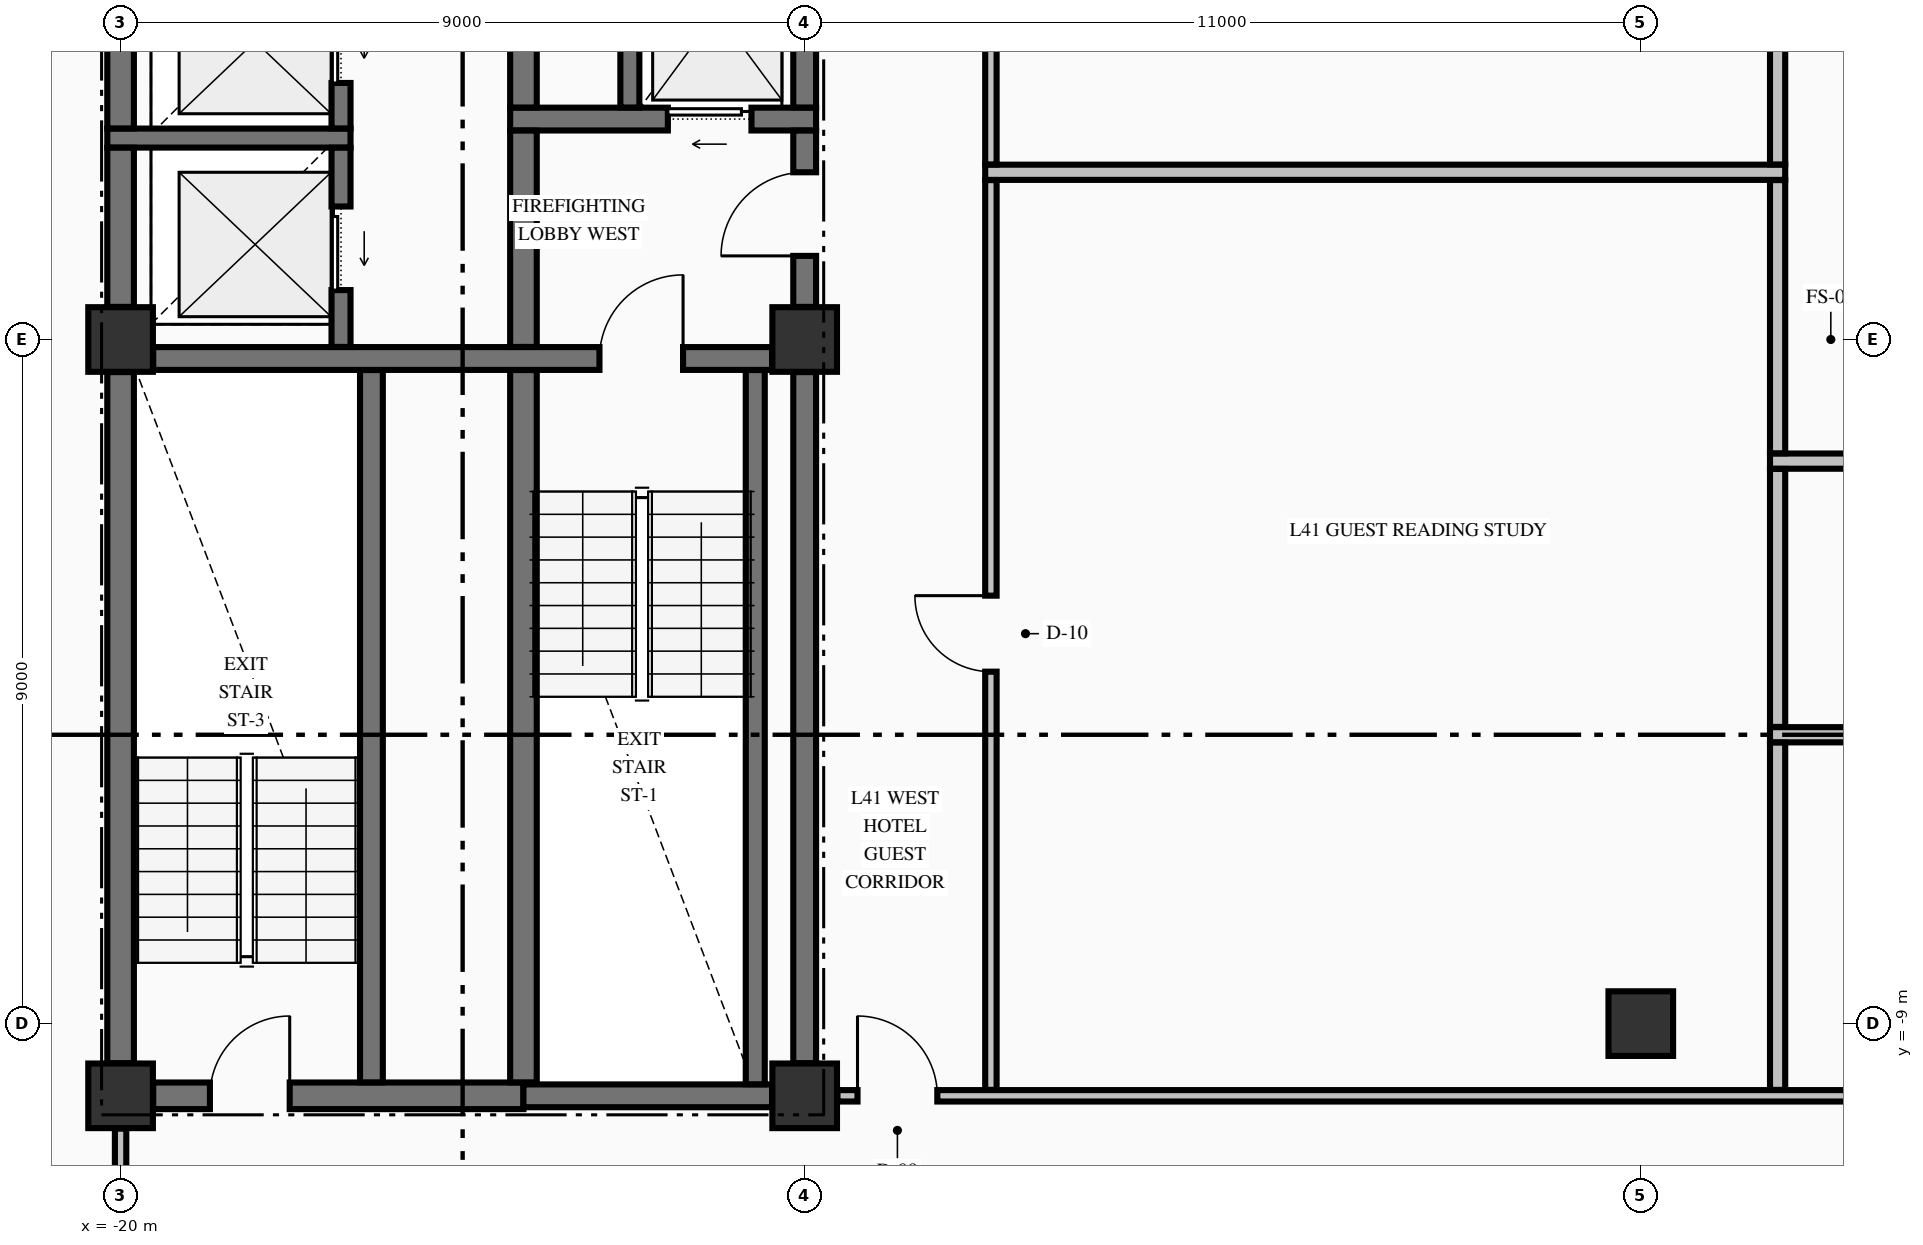
"""IFC4 building model, lengths in metres.
Left out: names, types, materials, properties, quantities, classifications, styles, units other than length and angle.
Written with IfcOpenShell. Run it as: python <this file> out.ifc"""

import sys

from ifc_helpers import new_model, si_unit, direction, frame, frame_2d, origin, origin_2d, place, context, subcontext, project, spatial, rectangle, extrude, element, fill, save


model = new_model("IFC4")
c1 = context("Model", 3, precision=1e-05, world=origin(), true_north=direction((0.0, 1.0)))
c2 = subcontext(c1, "Body", "Model", "MODEL_VIEW")
j1 = project(units=[si_unit("LENGTHUNIT", "METRE"), si_unit("PLANEANGLEUNIT", "RADIAN")], contexts=[c1])
p1 = place(None, origin())
s1 = spatial("IfcSite", under=j1, at=p1, CompositionType="ELEMENT")
p2 = place(p1, origin())
s2 = spatial("IfcBuilding", under=s1, at=p2, CompositionType="ELEMENT")
p3 = place(p2, frame((0.0, 0.0, 162.66)))
s3 = spatial("IfcBuildingStorey", under=s2, at=p3, CompositionType="ELEMENT", Elevation=162.66)
for number, where, z_axis, x_axis in (
    (1, (-20.0, -9.95, -0.25), (0.0, 0.0, 1.0), (1.0, 0.0, 0.0)),
    (2, (-11.0, -9.95, -0.25), (0.0, 0.0, 1.0), (1.0, 0.0, 0.0)),
    (3, (-11.0, 0.0, -0.25), (0.0, 0.0, 1.0), (1.0, 0.0, 0.0)),
    (4, (0.0, -9.0, -0.25), (0.0, 0.0, 1.0), (1.0, 0.0, 0.0)),
    (5, (-20.0, 0.0, -0.25), (0.0, 0.0, 1.0), (1.0, 0.0, 0.0)),
):
    element("IfcColumn", number, at=place(p3, frame(where, z_axis=z_axis, x_axis=x_axis)), inside=s3, PredefinedType="COLUMN", context=c2, shape_type="SweptSolid", body=[
        extrude(rectangle(XDim=0.85, YDim=0.85, at=origin_2d()), origin(), (0.0, 0.0, 1.0), 3.4),
    ])
p4 = place(p3, frame((-19.571, -9.95, 0.0), z_axis=(0.0, 0.0, 1.0), x_axis=(1.0, 0.0, 0.0)))
e6 = element("IfcWall", 6, at=p4, inside=s3, PredefinedType="SHEAR", context=c2, shape_type="SweptSolid", body=[
    extrude(rectangle(XDim=4.871, YDim=0.35, at=frame_2d((2.436, 0.0))), origin(), (0.0, 0.0, 1.0), 3.15),
])
p5 = place(p4, frame((0.746, 0.0, 0.0)))
e7 = element("IfcOpeningElement", 7, at=p5, cuts=e6, PredefinedType="OPENING", context=c2, shape_type="SweptSolid", body=[
    extrude(rectangle(XDim=1.05, YDim=2.15, at=frame_2d((0.525, 1.075))), frame((0.0, 0.185, 0.0), z_axis=(0.0, -1.0, 0.0), x_axis=(1.0, 0.0, 0.0)), (0.0, 0.0, 1.0), 0.37),
])
p6 = place(p3, frame((-14.7, -9.95, 0.0), z_axis=(0.0, 0.0, 1.0), x_axis=(1.0, 0.0, 0.0)))
e8 = element("IfcWall", 8, at=p6, inside=s3, PredefinedType="SHEAR", context=c2, shape_type="SweptSolid", body=[
    extrude(rectangle(XDim=3.271, YDim=0.3, at=frame_2d((1.635, 0.0))), origin(), (0.0, 0.0, 1.0), 3.15),
])
p7 = place(p3, frame((-19.571, -0.25, 0.0), z_axis=(0.0, 0.0, 1.0), x_axis=(1.0, 0.0, 0.0)))
e9 = element("IfcWall", 9, at=p7, inside=s3, PredefinedType="SHEAR", context=c2, shape_type="SweptSolid", body=[
    extrude(rectangle(XDim=8.142, YDim=0.3, at=frame_2d((4.071, 0.0))), origin(), (0.0, 0.0, 1.0), 3.15),
])
p8 = place(p7, frame((5.871, 0.0, 0.0)))
e10 = element("IfcOpeningElement", 10, at=p8, cuts=e9, PredefinedType="OPENING", context=c2, shape_type="SweptSolid", body=[
    extrude(rectangle(XDim=1.1, YDim=2.15, at=frame_2d((0.55, 1.075))), frame((0.0, 0.16, 0.0), z_axis=(0.0, -1.0, 0.0), x_axis=(1.0, 0.0, 0.0)), (0.0, 0.0, 1.0), 0.32),
])
p9 = place(p3, frame((-20.175, 2.65, 0.0), z_axis=(0.0, 0.0, 1.0), x_axis=(1.0, 0.0, 0.0)))
e11 = element("IfcWall", 11, at=p9, inside=s3, PredefinedType="SOLIDWALL", context=c2, shape_type="SweptSolid", body=[
    extrude(rectangle(XDim=3.2, YDim=0.25, at=frame_2d((1.6, 0.0))), origin(), (0.0, 0.0, 1.0), 3.15),
])
p10 = place(p3, frame((-14.875, 2.9, 0.0), z_axis=(0.0, 0.0, 1.0), x_axis=(1.0, 0.0, 0.0)))
e12 = element("IfcWall", 12, at=p10, inside=s3, PredefinedType="SHEAR", context=c2, shape_type="SweptSolid", body=[
    extrude(rectangle(XDim=4.025, YDim=0.3, at=frame_2d((2.012, 0.0))), origin(), (0.0, 0.0, 1.0), 3.15),
])
p11 = place(p10, frame((2.075, 0.0, 0.0)))
e13 = element("IfcOpeningElement", 13, at=p11, cuts=e12, PredefinedType="OPENING", context=c2, shape_type="SweptSolid", body=[
    extrude(rectangle(XDim=1.1, YDim=2.2, at=frame_2d((0.55, 1.1))), frame((0.0, 0.16, 0.0), z_axis=(0.0, -1.0, 0.0), x_axis=(1.0, 0.0, 0.0)), (0.0, 0.0, 1.0), 0.32),
])
p12 = place(p3, frame((-10.569, -9.95, 0.0), z_axis=(0.0, 0.0, 1.0), x_axis=(1.0, 0.0, 0.0)))
e14 = element("IfcWall", 14, at=p12, inside=s3, PredefinedType="PARTITIONING", context=c2, shape_type="SweptSolid", body=[
    extrude(rectangle(XDim=21.138, YDim=0.15, at=frame_2d((10.569, 0.0))), origin(), (0.0, 0.0, 1.0), 3.15),
])
p13 = place(p12, frame((0.264, 0.0, 0.0)))
e15 = element("IfcOpeningElement", 15, at=p13, cuts=e14, PredefinedType="OPENING", context=c2, shape_type="SweptSolid", body=[
    extrude(rectangle(XDim=1.05, YDim=2.15, at=frame_2d((0.525, 1.075))), frame((0.0, 0.085, 0.0), z_axis=(0.0, -1.0, 0.0), x_axis=(1.0, 0.0, 0.0)), (0.0, 0.0, 1.0), 0.17),
])
p14 = place(p12, frame((19.824, 0.0, 0.0)))
e16 = element("IfcOpeningElement", 16, at=p14, cuts=e14, PredefinedType="OPENING", context=c2, shape_type="SweptSolid", body=[
    extrude(rectangle(XDim=1.05, YDim=2.15, at=frame_2d((0.525, 1.075))), frame((0.0, 0.085, 0.0), z_axis=(0.0, -1.0, 0.0), x_axis=(1.0, 0.0, 0.0)), (0.0, 0.0, 1.0), 0.17),
])
p15 = place(p12, frame((13.774, 0.0, 0.0)))
e17 = element("IfcOpeningElement", 17, at=p15, cuts=e14, PredefinedType="OPENING", context=c2, shape_type="SweptSolid", body=[
    extrude(rectangle(XDim=0.95, YDim=2.15, at=frame_2d((0.475, 1.075))), frame((0.0, 0.085, 0.0), z_axis=(0.0, -1.0, 0.0), x_axis=(1.0, 0.0, 0.0)), (0.0, 0.0, 1.0), 0.17),
])
for number, where, z_axis, x_axis in (
    (18, (1.7, -5.2, 0.0), (0.0, 0.0, 1.0), (1.0, 0.0, 0.0)),
    (19, (1.7, -1.6, 0.0), (0.0, 0.0, 1.0), (1.0, 0.0, 0.0)),
):
    element("IfcWall", number, at=place(p3, frame(where, z_axis=z_axis, x_axis=x_axis)), inside=s3, PredefinedType="PARTITIONING", context=c2, shape_type="SweptSolid", body=[
        extrude(rectangle(XDim=6.925, YDim=0.2, at=frame_2d((3.462, 0.0))), origin(), (0.0, 0.0, 1.0), 3.15),
    ])
p16 = place(p3, frame((-8.625, 2.2, 0.0), z_axis=(0.0, 0.0, 1.0), x_axis=(1.0, 0.0, 0.0)))
e20 = element("IfcWall", 20, at=p16, inside=s3, PredefinedType="PARTITIONING", context=c2, shape_type="SweptSolid", body=[
    extrude(rectangle(XDim=10.525, YDim=0.2, at=frame_2d((5.262, 0.0))), origin(), (0.0, 0.0, 1.0), 3.15),
])
p17 = place(p3, frame((-20.0, -9.521, 0.0), z_axis=(0.0, 0.0, 1.0), x_axis=(0.0, 1.0, 0.0)))
e21 = element("IfcWall", 21, at=p17, inside=s3, PredefinedType="SHEAR", context=c2, shape_type="SweptSolid", body=[
    extrude(rectangle(XDim=9.092, YDim=0.35, at=frame_2d((4.546, 0.0))), origin(), (0.0, 0.0, 1.0), 3.15),
])
p18 = place(p3, frame((-20.0, 0.429, 0.0), z_axis=(0.0, 0.0, 1.0), x_axis=(0.0, 1.0, 0.0)))
e22 = element("IfcWall", 22, at=p18, inside=s3, PredefinedType="SHEAR", context=c2, shape_type="SweptSolid", body=[
    extrude(rectangle(XDim=2.094, YDim=0.35, at=frame_2d((1.047, 0.0))), origin(), (0.0, 0.0, 1.0), 3.15),
])
p19 = place(p3, frame((-20.0, 2.777, 0.0), z_axis=(0.0, 0.0, 1.0), x_axis=(0.0, 1.0, 0.0)))
e23 = element("IfcWall", 23, at=p19, inside=s3, PredefinedType="SHEAR", context=c2, shape_type="SweptSolid", body=[
    extrude(rectangle(XDim=2.296, YDim=0.35, at=frame_2d((1.148, 0.0))), origin(), (0.0, 0.0, 1.0), 3.15),
])
p20 = place(p3, frame((-17.1, -0.098, 0.0), z_axis=(0.0, 0.0, 1.0), x_axis=(0.0, 1.0, 0.0)))
e24 = element("IfcWall", 24, at=p20, inside=s3, PredefinedType="SOLIDWALL", context=c2, shape_type="SweptSolid", body=[
    extrude(rectangle(XDim=2.621, YDim=0.25, at=frame_2d((1.311, 0.0))), origin(), (0.0, 0.0, 1.0), 3.15),
])
p21 = place(p20, frame((0.748, 0.0, 0.0)))
e25 = element("IfcOpeningElement", 25, at=p21, cuts=e24, PredefinedType="OPENING", context=c2, shape_type="SweptSolid", body=[
    extrude(rectangle(XDim=1.1, YDim=2.2, at=frame_2d((0.55, 1.1))), frame((0.0, 0.135, 0.0), z_axis=(0.0, -1.0, 0.0), x_axis=(1.0, 0.0, 0.0)), (0.0, 0.0, 1.0), 0.27),
])
p22 = place(p3, frame((-17.1, 2.777, 0.0), z_axis=(0.0, 0.0, 1.0), x_axis=(0.0, 1.0, 0.0)))
e26 = element("IfcWall", 26, at=p22, inside=s3, PredefinedType="SOLIDWALL", context=c2, shape_type="SweptSolid", body=[
    extrude(rectangle(XDim=2.296, YDim=0.25, at=frame_2d((1.148, 0.0))), origin(), (0.0, 0.0, 1.0), 3.15),
])
p23 = place(p22, frame((0.598, 0.0, 0.0)))
e27 = element("IfcOpeningElement", 27, at=p23, cuts=e26, PredefinedType="OPENING", context=c2, shape_type="SweptSolid", body=[
    extrude(rectangle(XDim=1.1, YDim=2.2, at=frame_2d((0.55, 1.1))), frame((0.0, 0.135, 0.0), z_axis=(0.0, -1.0, 0.0), x_axis=(1.0, 0.0, 0.0)), (0.0, 0.0, 1.0), 0.27),
])
p24 = place(p3, frame((-16.7, -9.773, 0.0), z_axis=(0.0, 0.0, 1.0), x_axis=(0.0, 1.0, 0.0)))
e28 = element("IfcWall", 28, at=p24, inside=s3, PredefinedType="SHEAR", context=c2, shape_type="SweptSolid", body=[
    extrude(rectangle(XDim=9.371, YDim=0.3, at=frame_2d((4.686, 0.0))), origin(), (0.0, 0.0, 1.0), 3.15),
])
p25 = place(p3, frame((-14.7, -9.773, 0.0), z_axis=(0.0, 0.0, 1.0), x_axis=(0.0, 1.0, 0.0)))
e29 = element("IfcWall", 29, at=p25, inside=s3, PredefinedType="SHEAR", context=c2, shape_type="SweptSolid", body=[
    extrude(rectangle(XDim=9.371, YDim=0.35, at=frame_2d((4.686, 0.0))), origin(), (0.0, 0.0, 1.0), 3.15),
])
p26 = place(p3, frame((-14.7, -0.098, 0.0), z_axis=(0.0, 0.0, 1.0), x_axis=(0.0, 1.0, 0.0)))
e30 = element("IfcWall", 30, at=p26, inside=s3, PredefinedType="SHEAR", context=c2, shape_type="SweptSolid", body=[
    extrude(rectangle(XDim=2.846, YDim=0.35, at=frame_2d((1.423, 0.0))), origin(), (0.0, 0.0, 1.0), 3.15),
])
p27 = place(p3, frame((-14.7, 3.052, 0.0), z_axis=(0.0, 0.0, 1.0), x_axis=(0.0, 1.0, 0.0)))
e31 = element("IfcWall", 31, at=p27, inside=s3, PredefinedType="SHEAR", context=c2, shape_type="SweptSolid", body=[
    extrude(rectangle(XDim=2.496, YDim=0.35, at=frame_2d((1.248, 0.0))), origin(), (0.0, 0.0, 1.0), 3.15),
])
p28 = place(p3, frame((-13.3, 3.052, 0.0), z_axis=(0.0, 0.0, 1.0), x_axis=(0.0, 1.0, 0.0)))
e32 = element("IfcWall", 32, at=p28, inside=s3, PredefinedType="SOLIDWALL", context=c2, shape_type="SweptSolid", body=[
    extrude(rectangle(XDim=2.496, YDim=0.25, at=frame_2d((1.248, 0.0))), origin(), (0.0, 0.0, 1.0), 3.15),
])
p29 = place(p3, frame((-11.65, -9.798, 0.0), z_axis=(0.0, 0.0, 1.0), x_axis=(0.0, 1.0, 0.0)))
e33 = element("IfcWall", 33, at=p29, inside=s3, PredefinedType="SOLIDWALL", context=c2, shape_type="SweptSolid", body=[
    extrude(rectangle(XDim=9.396, YDim=0.25, at=frame_2d((4.698, 0.0))), origin(), (0.0, 0.0, 1.0), 3.15),
])
p30 = place(p3, frame((-11.0, -9.521, 0.0), z_axis=(0.0, 0.0, 1.0), x_axis=(0.0, 1.0, 0.0)))
e34 = element("IfcWall", 34, at=p30, inside=s3, PredefinedType="SHEAR", context=c2, shape_type="SweptSolid", body=[
    extrude(rectangle(XDim=9.092, YDim=0.3, at=frame_2d((4.546, 0.0))), origin(), (0.0, 0.0, 1.0), 3.15),
])
p31 = place(p3, frame((-11.0, 0.429, 0.0), z_axis=(0.0, 0.0, 1.0), x_axis=(0.0, 1.0, 0.0)))
e35 = element("IfcWall", 35, at=p31, inside=s3, PredefinedType="SHEAR", context=c2, shape_type="SweptSolid", body=[
    extrude(rectangle(XDim=2.319, YDim=0.3, at=frame_2d((1.16, 0.0))), origin(), (0.0, 0.0, 1.0), 3.15),
])
p32 = place(p31, frame((0.671, 0.0, 0.0)))
e36 = element("IfcOpeningElement", 36, at=p32, cuts=e35, PredefinedType="OPENING", context=c2, shape_type="SweptSolid", body=[
    extrude(rectangle(XDim=1.1, YDim=2.15, at=frame_2d((0.55, 1.075))), frame((0.0, 0.16, 0.0), z_axis=(0.0, -1.0, 0.0), x_axis=(1.0, 0.0, 0.0)), (0.0, 0.0, 1.0), 0.32),
])
p33 = place(p3, frame((-11.0, 3.052, 0.0), z_axis=(0.0, 0.0, 1.0), x_axis=(0.0, 1.0, 0.0)))
e37 = element("IfcWall", 37, at=p33, inside=s3, PredefinedType="SHEAR", context=c2, shape_type="SweptSolid", body=[
    extrude(rectangle(XDim=2.496, YDim=0.3, at=frame_2d((1.248, 0.0))), origin(), (0.0, 0.0, 1.0), 3.15),
])
p34 = place(p3, frame((-20.0, -13.022, 0.0), z_axis=(0.0, 0.0, 1.0), x_axis=(0.0, 1.0, 0.0)))
e38 = element("IfcWall", 38, at=p34, inside=s3, PredefinedType="PARTITIONING", context=c2, shape_type="SweptSolid", body=[
    extrude(rectangle(XDim=2.641, YDim=0.15, at=frame_2d((1.32, 0.0))), origin(), (0.0, 0.0, 1.0), 2.342),
])
p35 = place(p3, frame((-8.55, -9.872, 0.0), z_axis=(0.0, 0.0, 1.0), x_axis=(0.0, 1.0, 0.0)))
e39 = element("IfcWall", 39, at=p35, inside=s3, PredefinedType="PARTITIONING", context=c2, shape_type="SweptSolid", body=[
    extrude(rectangle(XDim=11.969, YDim=0.15, at=frame_2d((5.984, 0.0))), origin(), (0.0, 0.0, 1.0), 3.15),
])
p36 = place(p35, frame((5.502, 0.0, 0.0)))
e40 = element("IfcOpeningElement", 40, at=p36, cuts=e39, PredefinedType="OPENING", context=c2, shape_type="SweptSolid", body=[
    extrude(rectangle(XDim=1.0, YDim=2.15, at=frame_2d((0.5, 1.075))), frame((0.0, 0.085, 0.0), z_axis=(0.0, -1.0, 0.0), x_axis=(1.0, 0.0, 0.0)), (0.0, 0.0, 1.0), 0.17),
])
p37 = place(p3, frame((-8.55, 2.303, 0.0), z_axis=(0.0, 0.0, 1.0), x_axis=(0.0, 1.0, 0.0)))
e41 = element("IfcWall", 41, at=p37, inside=s3, PredefinedType="PARTITIONING", context=c2, shape_type="SweptSolid", body=[
    extrude(rectangle(XDim=8.119, YDim=0.15, at=frame_2d((4.06, 0.0))), origin(), (0.0, 0.0, 1.0), 3.15),
])
p38 = place(p37, frame((3.497, 0.0, 0.0)))
e42 = element("IfcOpeningElement", 42, at=p38, cuts=e41, PredefinedType="OPENING", context=c2, shape_type="SweptSolid", body=[
    extrude(rectangle(XDim=1.1, YDim=2.15, at=frame_2d((0.55, 1.075))), frame((0.0, 0.085, 0.0), z_axis=(0.0, -1.0, 0.0), x_axis=(1.0, 0.0, 0.0)), (0.0, 0.0, 1.0), 0.17),
])
p39 = place(p3, frame((1.8, -9.872, 0.0), z_axis=(0.0, 0.0, 1.0), x_axis=(0.0, 1.0, 0.0)))
e43 = element("IfcWall", 43, at=p39, inside=s3, PredefinedType="PARTITIONING", context=c2, shape_type="SweptSolid", body=[
    extrude(rectangle(XDim=4.569, YDim=0.2, at=frame_2d((2.285, 0.0))), origin(), (0.0, 0.0, 1.0), 3.15),
])
p40 = place(p3, frame((1.8, -5.097, 0.0), z_axis=(0.0, 0.0, 1.0), x_axis=(0.0, 1.0, 0.0)))
e44 = element("IfcWall", 44, at=p40, inside=s3, PredefinedType="PARTITIONING", context=c2, shape_type="SweptSolid", body=[
    extrude(rectangle(XDim=3.394, YDim=0.2, at=frame_2d((1.697, 0.0))), origin(), (0.0, 0.0, 1.0), 3.15),
])
p41 = place(p3, frame((1.8, -1.497, 0.0), z_axis=(0.0, 0.0, 1.0), x_axis=(0.0, 1.0, 0.0)))
e45 = element("IfcWall", 45, at=p41, inside=s3, PredefinedType="PARTITIONING", context=c2, shape_type="SweptSolid", body=[
    extrude(rectangle(XDim=3.594, YDim=0.2, at=frame_2d((1.797, 0.0))), origin(), (0.0, 0.0, 1.0), 3.15),
])
p42 = place(p3, frame((1.8, 2.303, 0.0), z_axis=(0.0, 0.0, 1.0), x_axis=(0.0, 1.0, 0.0)))
e46 = element("IfcWall", 46, at=p42, inside=s3, PredefinedType="PARTITIONING", context=c2, shape_type="SweptSolid", body=[
    extrude(rectangle(XDim=8.119, YDim=0.2, at=frame_2d((4.06, 0.0))), origin(), (0.0, 0.0, 1.0), 3.15),
])
p43 = place(p8, origin())
e47 = element("IfcDoor", 47, at=p43, inside=s3, OperationType="SINGLE_SWING_RIGHT", PredefinedType="DOOR", context=c2, shape_type="SweptSolid", body=[
    extrude(rectangle(XDim=1.1, YDim=2.15, at=frame_2d((0.55, 1.075))), frame((0.0, 0.025, 0.0), z_axis=(0.0, -1.0, 0.0), x_axis=(1.0, 0.0, 0.0)), (0.0, 0.0, 1.0), 0.05),
])
fill(e10, e47)
p44 = place(p32, origin())
e48 = element("IfcDoor", 48, at=p44, inside=s3, OperationType="SINGLE_SWING_LEFT", PredefinedType="DOOR", context=c2, shape_type="SweptSolid", body=[
    extrude(rectangle(XDim=1.1, YDim=2.15, at=frame_2d((0.55, 1.075))), frame((0.0, 0.025, 0.0), z_axis=(0.0, -1.0, 0.0), x_axis=(1.0, 0.0, 0.0)), (0.0, 0.0, 1.0), 0.05),
])
fill(e36, e48)
p45 = place(p11, origin())
e49 = element("IfcDoor", 49, at=p45, inside=s3, OperationType="SLIDING_TO_LEFT", PredefinedType="DOOR", context=c2, shape_type="SweptSolid", body=[
    extrude(rectangle(XDim=1.1, YDim=2.2, at=frame_2d((0.55, 1.1))), frame((0.0, 0.025, 0.0), z_axis=(0.0, -1.0, 0.0), x_axis=(1.0, 0.0, 0.0)), (0.0, 0.0, 1.0), 0.05),
])
fill(e13, e49)
p46 = place(p5, origin())
e50 = element("IfcDoor", 50, at=p46, inside=s3, OperationType="SINGLE_SWING_RIGHT", PredefinedType="DOOR", context=c2, shape_type="SweptSolid", body=[
    extrude(rectangle(XDim=1.05, YDim=2.15, at=frame_2d((0.525, 1.075))), frame((0.0, 0.025, 0.0), z_axis=(0.0, -1.0, 0.0), x_axis=(1.0, 0.0, 0.0)), (0.0, 0.0, 1.0), 0.05),
])
fill(e7, e50)
p47 = place(p21, origin())
e51 = element("IfcDoor", 51, at=p47, inside=s3, OperationType="SLIDING_TO_LEFT", PredefinedType="DOOR", context=c2, shape_type="SweptSolid", body=[
    extrude(rectangle(XDim=1.1, YDim=2.2, at=frame_2d((0.55, 1.1))), frame((0.0, 0.025, 0.0), z_axis=(0.0, -1.0, 0.0), x_axis=(1.0, 0.0, 0.0)), (0.0, 0.0, 1.0), 0.05),
])
fill(e25, e51)
p48 = place(p23, origin())
e52 = element("IfcDoor", 52, at=p48, inside=s3, OperationType="SLIDING_TO_LEFT", PredefinedType="DOOR", context=c2, shape_type="SweptSolid", body=[
    extrude(rectangle(XDim=1.1, YDim=2.2, at=frame_2d((0.55, 1.1))), frame((0.0, 0.025, 0.0), z_axis=(0.0, -1.0, 0.0), x_axis=(1.0, 0.0, 0.0)), (0.0, 0.0, 1.0), 0.05),
])
fill(e27, e52)
p49 = place(p13, origin())
e53 = element("IfcDoor", 53, at=p49, inside=s3, OperationType="SINGLE_SWING_LEFT", PredefinedType="DOOR", context=c2, shape_type="SweptSolid", body=[
    extrude(rectangle(XDim=1.05, YDim=2.15, at=frame_2d((0.525, 1.075))), frame((0.0, 0.025, 0.0), z_axis=(0.0, -1.0, 0.0), x_axis=(1.0, 0.0, 0.0)), (0.0, 0.0, 1.0), 0.05),
])
fill(e15, e53)
p50 = place(p36, origin())
e54 = element("IfcDoor", 54, at=p50, inside=s3, OperationType="SINGLE_SWING_RIGHT", PredefinedType="DOOR", context=c2, shape_type="SweptSolid", body=[
    extrude(rectangle(XDim=1.0, YDim=2.15, at=frame_2d((0.5, 1.075))), frame((0.0, 0.025, 0.0), z_axis=(0.0, -1.0, 0.0), x_axis=(1.0, 0.0, 0.0)), (0.0, 0.0, 1.0), 0.05),
])
fill(e40, e54)
save(model, sys.argv[1])
